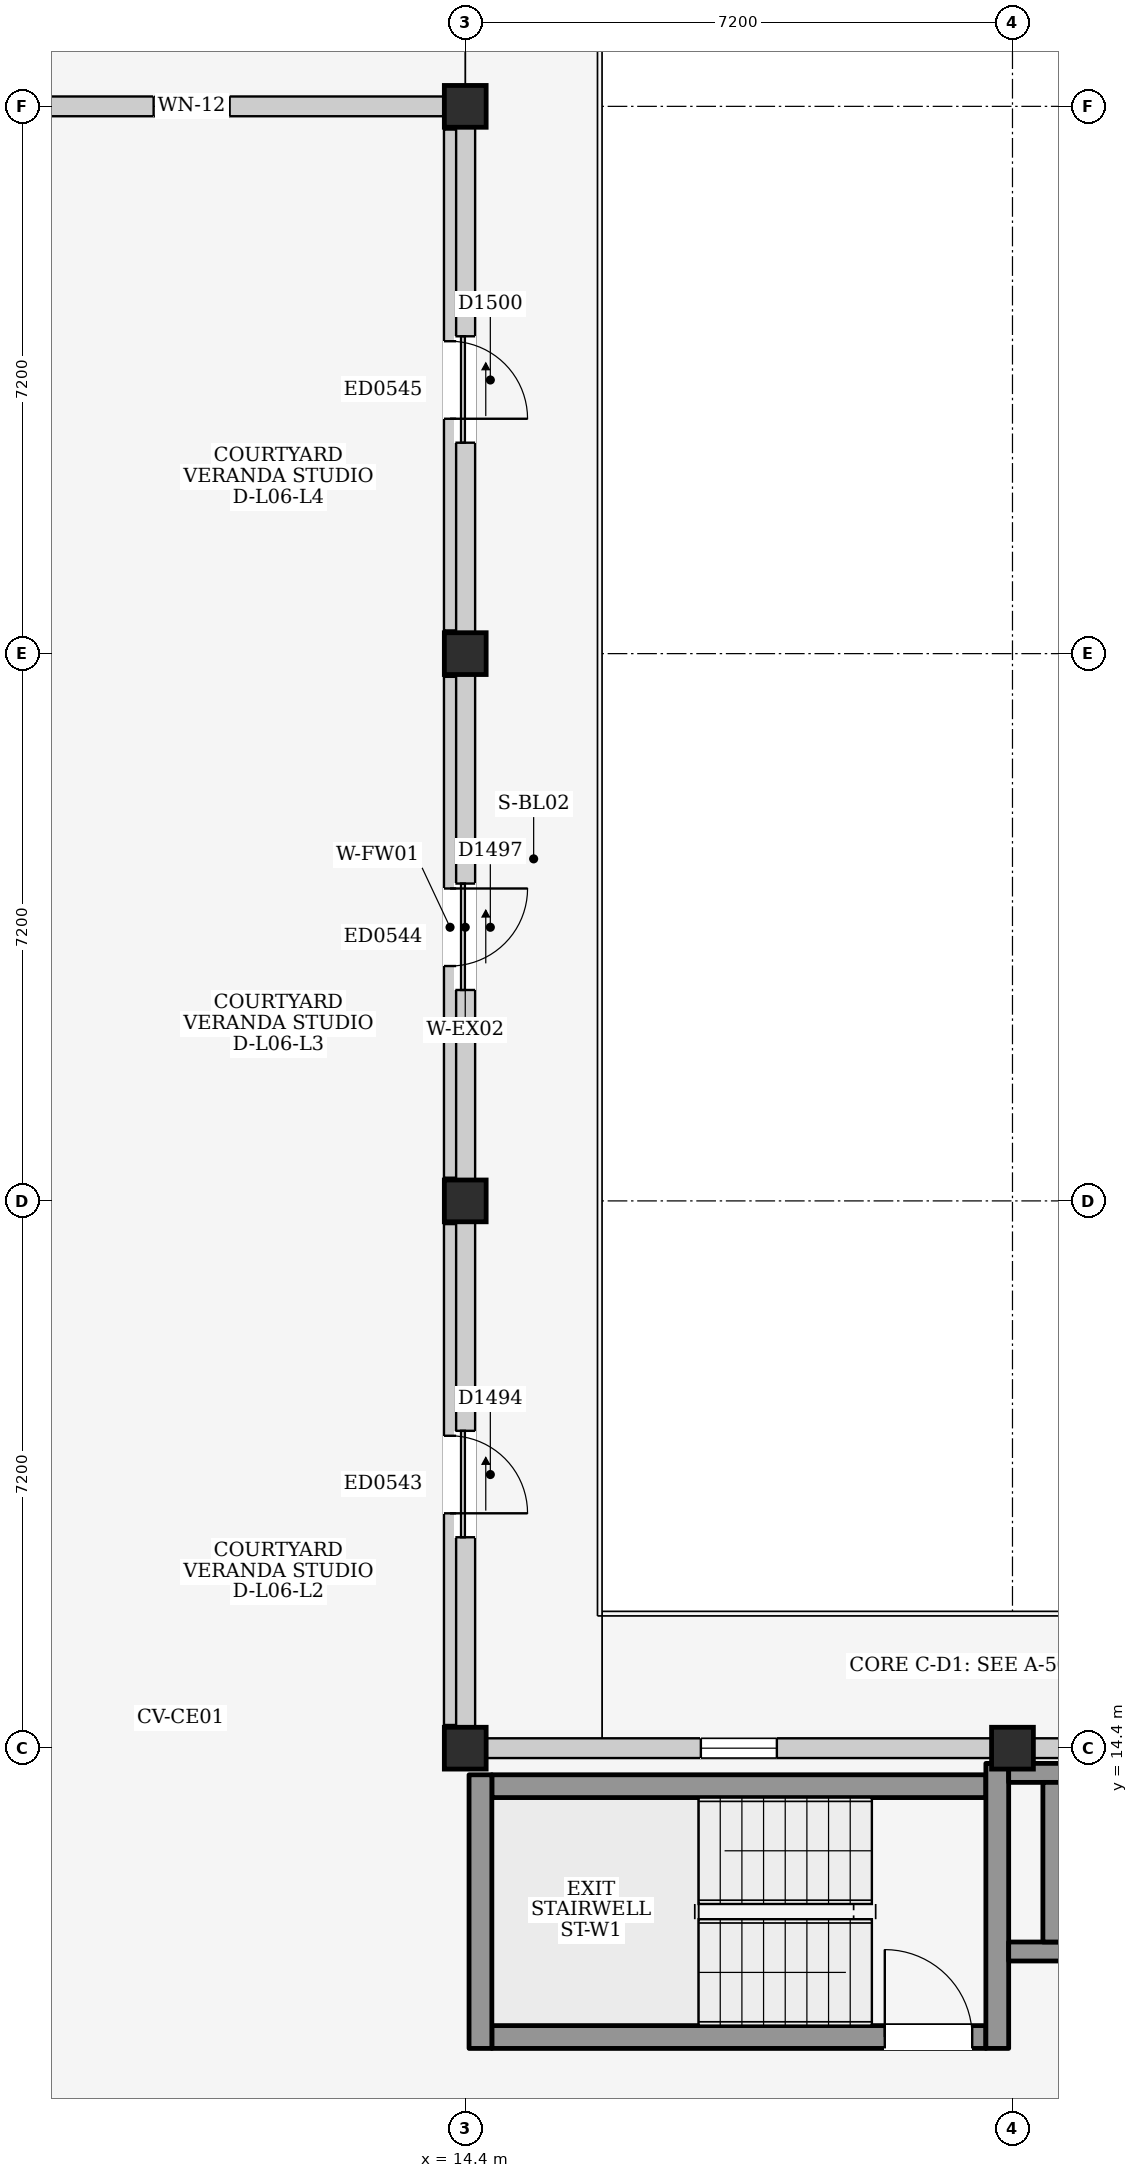
"""IFC4 building model, lengths in metres.
Left out: names, types, materials, properties, quantities, classifications, styles, units other than length and angle.
Written with IfcOpenShell. Run it as: python <this file> out.ifc"""

import sys

from ifc_helpers import new_model, si_unit, direction, frame, frame_2d, origin, origin_2d, place, context, subcontext, project, spatial, rectangle, extrude, element, fill, save


model = new_model("IFC4")
c1 = context("Model", 3, precision=1e-05, world=origin(), true_north=direction((0.0, 1.0)))
c2 = subcontext(c1, "Body", "Model", "MODEL_VIEW")
j1 = project(units=[si_unit("LENGTHUNIT", "METRE"), si_unit("PLANEANGLEUNIT", "RADIAN")], contexts=[c1])
p1 = place(None, origin())
s1 = spatial("IfcSite", under=j1, at=p1, CompositionType="ELEMENT")
p2 = place(p1, origin())
s2 = spatial("IfcBuilding", under=s1, at=p2, CompositionType="ELEMENT")
p3 = place(p2, frame((0.0, 0.0, 21.9)))
s3 = spatial("IfcBuildingStorey", under=s2, at=p3, CompositionType="ELEMENT", Elevation=21.9)
for number, where, z_axis, x_axis in (
    (1, (14.4, 14.4, 0.0), (0.0, 0.0, 1.0), (1.0, 0.0, 0.0)),
    (2, (14.4, 21.6, 0.0), (0.0, 0.0, 1.0), (1.0, 0.0, 0.0)),
    (3, (14.4, 28.8, 0.0), (0.0, 0.0, 1.0), (1.0, 0.0, 0.0)),
    (4, (14.4, 36.0, 0.0), (0.0, 0.0, 1.0), (1.0, 0.0, 0.0)),
    (5, (21.6, 14.4, 0.0), (0.0, 0.0, 1.0), (1.0, 0.0, 0.0)),
):
    element("IfcColumn", number, at=place(p3, frame(where, z_axis=z_axis, x_axis=x_axis)), inside=s3, PredefinedType="COLUMN", context=c2, shape_type="SweptSolid", body=[
        extrude(rectangle(XDim=0.55, YDim=0.55, at=origin_2d()), origin(), (0.0, 0.0, 1.0), 3.2),
    ])
p4 = place(p3, frame((14.4, 14.675, 0.0), z_axis=(0.0, 0.0, 1.0), x_axis=(0.0, 1.0, 0.0)))
e6 = element("IfcWall", 6, at=p4, inside=s3, PredefinedType="ELEMENTEDWALL", context=c2, shape_type="SweptSolid", body=[
    extrude(rectangle(XDim=6.65, YDim=0.26, at=frame_2d((3.325, 0.0))), origin(), (0.0, 0.0, 1.0), 2.465),
])
p5 = place(p4, frame((2.5, 0.0, 0.0)))
e7 = element("IfcOpeningElement", 7, at=p5, cuts=e6, PredefinedType="OPENING", context=c2, shape_type="SweptSolid", body=[
    extrude(rectangle(XDim=1.4, YDim=2.1, at=frame_2d((0.7, 1.05))), frame((0.0, 0.145, 0.0), z_axis=(0.0, -1.0, 0.0), x_axis=(1.0, 0.0, 0.0)), (0.0, 0.0, 1.0), 0.29),
])
p6 = place(p3, frame((14.4, 21.875, 0.0), z_axis=(0.0, 0.0, 1.0), x_axis=(0.0, 1.0, 0.0)))
e8 = element("IfcWall", 8, at=p6, inside=s3, PredefinedType="ELEMENTEDWALL", context=c2, shape_type="SweptSolid", body=[
    extrude(rectangle(XDim=6.65, YDim=0.26, at=frame_2d((3.325, 0.0))), origin(), (0.0, 0.0, 1.0), 2.465),
])
p7 = place(p6, frame((2.5, 0.0, 0.0)))
e9 = element("IfcOpeningElement", 9, at=p7, cuts=e8, PredefinedType="OPENING", context=c2, shape_type="SweptSolid", body=[
    extrude(rectangle(XDim=1.4, YDim=2.1, at=frame_2d((0.7, 1.05))), frame((0.0, 0.145, 0.0), z_axis=(0.0, -1.0, 0.0), x_axis=(1.0, 0.0, 0.0)), (0.0, 0.0, 1.0), 0.29),
])
p8 = place(p3, frame((7.475, 36.0, 0.0), z_axis=(0.0, 0.0, 1.0), x_axis=(1.0, 0.0, 0.0)))
e10 = element("IfcWall", 10, at=p8, inside=s3, PredefinedType="ELEMENTEDWALL", context=c2, shape_type="SweptSolid", body=[
    extrude(rectangle(XDim=6.65, YDim=0.26, at=frame_2d((3.325, 0.0))), origin(), (0.0, 0.0, 1.0), 2.365),
])
p9 = place(p8, frame((2.825, 0.0, 1.1)))
e11 = element("IfcOpeningElement", 11, at=p9, cuts=e10, PredefinedType="OPENING", context=c2, shape_type="SweptSolid", body=[
    extrude(rectangle(XDim=1.0, YDim=0.9, at=frame_2d((0.5, 0.45))), frame((0.0, 0.145, 0.0), z_axis=(0.0, -1.0, 0.0), x_axis=(1.0, 0.0, 0.0)), (0.0, 0.0, 1.0), 0.29),
])
p10 = place(p3, frame((14.4, 29.075, 0.0), z_axis=(0.0, 0.0, 1.0), x_axis=(0.0, 1.0, 0.0)))
e12 = element("IfcWall", 12, at=p10, inside=s3, PredefinedType="ELEMENTEDWALL", context=c2, shape_type="SweptSolid", body=[
    extrude(rectangle(XDim=6.65, YDim=0.26, at=frame_2d((3.325, 0.0))), origin(), (0.0, 0.0, 1.0), 2.465),
])
p11 = place(p10, frame((2.5, 0.0, 0.0)))
e13 = element("IfcOpeningElement", 13, at=p11, cuts=e12, PredefinedType="OPENING", context=c2, shape_type="SweptSolid", body=[
    extrude(rectangle(XDim=1.4, YDim=2.1, at=frame_2d((0.7, 1.05))), frame((0.0, 0.145, 0.0), z_axis=(0.0, -1.0, 0.0), x_axis=(1.0, 0.0, 0.0)), (0.0, 0.0, 1.0), 0.29),
])
p12 = place(p3, frame((14.675, 14.4, 0.0), z_axis=(0.0, 0.0, 1.0), x_axis=(1.0, 0.0, 0.0)))
e14 = element("IfcWall", 14, at=p12, inside=s3, PredefinedType="ELEMENTEDWALL", context=c2, shape_type="SweptSolid", body=[
    extrude(rectangle(XDim=6.65, YDim=0.26, at=frame_2d((3.325, 0.0))), origin(), (0.0, 0.0, 1.0), 2.365),
])
p13 = place(p12, frame((2.825, 0.0, 1.2)))
e15 = element("IfcOpeningElement", 15, at=p13, cuts=e14, PredefinedType="OPENING", context=c2, shape_type="SweptSolid", body=[
    extrude(rectangle(XDim=1.0, YDim=0.9, at=frame_2d((0.5, 0.45))), frame((0.0, 0.145, 0.0), z_axis=(0.0, -1.0, 0.0), x_axis=(1.0, 0.0, 0.0)), (0.0, 0.0, 1.0), 0.29),
])
p14 = place(p3, frame((21.875, 14.4, 0.0), z_axis=(0.0, 0.0, 1.0), x_axis=(1.0, 0.0, 0.0)))
e16 = element("IfcWall", 16, at=p14, inside=s3, PredefinedType="ELEMENTEDWALL", context=c2, shape_type="SweptSolid", body=[
    extrude(rectangle(XDim=6.65, YDim=0.26, at=frame_2d((3.325, 0.0))), origin(), (0.0, 0.0, 1.0), 2.365),
])
p15 = place(p14, frame((2.825, 0.0, 1.2)))
e17 = element("IfcOpeningElement", 17, at=p15, cuts=e16, PredefinedType="OPENING", context=c2, shape_type="SweptSolid", body=[
    extrude(rectangle(XDim=1.0, YDim=0.9, at=frame_2d((0.5, 0.45))), frame((0.0, 0.145, 0.0), z_axis=(0.0, -1.0, 0.0), x_axis=(1.0, 0.0, 0.0)), (0.0, 0.0, 1.0), 0.29),
])
p16 = place(p3, frame((14.75, 10.6, 0.0), z_axis=(0.0, 0.0, 1.0), x_axis=(1.0, 0.0, 0.0)))
e18 = element("IfcWall", 18, at=p16, inside=s3, PredefinedType="SHEAR", context=c2, shape_type="SweptSolid", body=[
    extrude(rectangle(XDim=6.5, YDim=0.3, at=frame_2d((3.25, 0.0))), origin(), (0.0, 0.0, 1.0), 2.98),
])
p17 = place(p16, frame((5.17, 0.0, 0.0)))
e19 = element("IfcOpeningElement", 19, at=p17, cuts=e18, PredefinedType="OPENING", context=c2, shape_type="SweptSolid", body=[
    extrude(rectangle(XDim=1.15, YDim=2.2, at=frame_2d((0.575, 1.1))), frame((0.0, 0.165, 0.0), z_axis=(0.0, -1.0, 0.0), x_axis=(1.0, 0.0, 0.0)), (0.0, 0.0, 1.0), 0.33),
])
p18 = place(p3, frame((14.75, 13.9, 0.0), z_axis=(0.0, 0.0, 1.0), x_axis=(1.0, 0.0, 0.0)))
e20 = element("IfcWall", 20, at=p18, inside=s3, PredefinedType="SHEAR", context=c2, shape_type="SweptSolid", body=[
    extrude(rectangle(XDim=6.5, YDim=0.3, at=frame_2d((3.25, 0.0))), origin(), (0.0, 0.0, 1.0), 2.98),
])
p19 = place(p3, frame((14.6, 10.45, 0.0), z_axis=(0.0, 0.0, 1.0), x_axis=(0.0, 1.0, 0.0)))
e21 = element("IfcWall", 21, at=p19, inside=s3, PredefinedType="SHEAR", context=c2, shape_type="SweptSolid", body=[
    extrude(rectangle(XDim=3.6, YDim=0.3, at=frame_2d((1.8, 0.0))), origin(), (0.0, 0.0, 1.0), 2.98),
])
p20 = place(p3, frame((21.4, 10.45, 0.0), z_axis=(0.0, 0.0, 1.0), x_axis=(0.0, 1.0, 0.0)))
e22 = element("IfcWall", 22, at=p20, inside=s3, PredefinedType="SHEAR", context=c2, shape_type="SweptSolid", body=[
    extrude(rectangle(XDim=3.75, YDim=0.3, at=frame_2d((1.875, 0.0))), origin(), (0.0, 0.0, 1.0), 2.98),
])
p21 = place(p3, frame((21.55, 11.725, 0.0), z_axis=(0.0, 0.0, 1.0), x_axis=(1.0, 0.0, 0.0)))
e23 = element("IfcWall", 23, at=p21, inside=s3, PredefinedType="SHEAR", context=c2, shape_type="SweptSolid", body=[
    extrude(rectangle(XDim=2.55, YDim=0.25, at=frame_2d((1.275, 0.0))), origin(), (0.0, 0.0, 1.0), 2.98),
])
p22 = place(p21, frame((0.95, 0.0, 0.0)))
e24 = element("IfcOpeningElement", 24, at=p22, cuts=e23, PredefinedType="OPENING", context=c2, shape_type="SweptSolid", body=[
    extrude(rectangle(XDim=1.1, YDim=2.15, at=frame_2d((0.55, 1.075))), frame((0.0, 0.14, 0.0), z_axis=(0.0, -1.0, 0.0), x_axis=(1.0, 0.0, 0.0)), (0.0, 0.0, 1.0), 0.28),
])
p23 = place(p3, frame((21.55, 14.075, 0.0), z_axis=(0.0, 0.0, 1.0), x_axis=(1.0, 0.0, 0.0)))
e25 = element("IfcWall", 25, at=p23, inside=s3, PredefinedType="SHEAR", context=c2, shape_type="SweptSolid", body=[
    extrude(rectangle(XDim=2.55, YDim=0.25, at=frame_2d((1.275, 0.0))), origin(), (0.0, 0.0, 1.0), 2.98),
])
p24 = place(p3, frame((22.125, 11.85, 0.0), z_axis=(0.0, 0.0, 1.0), x_axis=(0.0, 1.0, 0.0)))
e26 = element("IfcWall", 26, at=p24, inside=s3, PredefinedType="SHEAR", context=c2, shape_type="SweptSolid", body=[
    extrude(rectangle(XDim=2.1, YDim=0.25, at=frame_2d((1.05, 0.0))), origin(), (0.0, 0.0, 1.0), 2.98),
])
p25 = place(p3, frame((14.2, 14.705, 0.0), z_axis=(0.0, 0.0, 1.0), x_axis=(0.0, 1.0, 0.0)))
e27 = element("IfcWall", 27, at=p25, inside=s3, PredefinedType="PARTITIONING", context=c2, shape_type="SweptSolid", body=[
    extrude(rectangle(XDim=6.59, YDim=0.16, at=frame_2d((3.295, 0.0))), origin(), (0.0, 0.0, 1.0), 2.98),
])
p26 = place(p25, frame((2.785, 0.0, 0.0)))
e28 = element("IfcOpeningElement", 28, at=p26, cuts=e27, PredefinedType="OPENING", context=c2, shape_type="SweptSolid", body=[
    extrude(rectangle(XDim=1.02, YDim=2.18, at=frame_2d((0.51, 1.09))), frame((0.0, 0.095, 0.0), z_axis=(0.0, -1.0, 0.0), x_axis=(1.0, 0.0, 0.0)), (0.0, 0.0, 1.0), 0.19),
])
p27 = place(p3, frame((14.2, 21.905, 0.0), z_axis=(0.0, 0.0, 1.0), x_axis=(0.0, 1.0, 0.0)))
e29 = element("IfcWall", 29, at=p27, inside=s3, PredefinedType="PARTITIONING", context=c2, shape_type="SweptSolid", body=[
    extrude(rectangle(XDim=6.59, YDim=0.16, at=frame_2d((3.295, 0.0))), origin(), (0.0, 0.0, 1.0), 2.98),
])
p28 = place(p27, frame((2.785, 0.0, 0.0)))
e30 = element("IfcOpeningElement", 30, at=p28, cuts=e29, PredefinedType="OPENING", context=c2, shape_type="SweptSolid", body=[
    extrude(rectangle(XDim=1.02, YDim=2.18, at=frame_2d((0.51, 1.09))), frame((0.0, 0.095, 0.0), z_axis=(0.0, -1.0, 0.0), x_axis=(1.0, 0.0, 0.0)), (0.0, 0.0, 1.0), 0.19),
])
p29 = place(p3, frame((14.2, 29.105, 0.0), z_axis=(0.0, 0.0, 1.0), x_axis=(0.0, 1.0, 0.0)))
e31 = element("IfcWall", 31, at=p29, inside=s3, PredefinedType="PARTITIONING", context=c2, shape_type="SweptSolid", body=[
    extrude(rectangle(XDim=6.59, YDim=0.16, at=frame_2d((3.295, 0.0))), origin(), (0.0, 0.0, 1.0), 2.98),
])
p30 = place(p29, frame((2.785, 0.0, 0.0)))
e32 = element("IfcOpeningElement", 32, at=p30, cuts=e31, PredefinedType="OPENING", context=c2, shape_type="SweptSolid", body=[
    extrude(rectangle(XDim=1.02, YDim=2.18, at=frame_2d((0.51, 1.09))), frame((0.0, 0.095, 0.0), z_axis=(0.0, -1.0, 0.0), x_axis=(1.0, 0.0, 0.0)), (0.0, 0.0, 1.0), 0.19),
])
p31 = place(p5, frame((1.4, 0.0, 0.0), z_axis=(0.0, 0.0, 1.0), x_axis=(-1.0, 0.0, 0.0)))
e33 = element("IfcDoor", 33, at=p31, inside=s3, OperationType="SLIDING_TO_RIGHT", PredefinedType="DOOR", context=c2, shape_type="SweptSolid", body=[
    extrude(rectangle(XDim=1.4, YDim=2.1, at=frame_2d((0.7, 1.05))), frame((0.0, 0.025, 0.0), z_axis=(0.0, -1.0, 0.0), x_axis=(1.0, 0.0, 0.0)), (0.0, 0.0, 1.0), 0.05),
])
fill(e7, e33)
p32 = place(p7, frame((1.4, 0.0, 0.0), z_axis=(0.0, 0.0, 1.0), x_axis=(-1.0, 0.0, 0.0)))
e34 = element("IfcDoor", 34, at=p32, inside=s3, OperationType="SLIDING_TO_RIGHT", PredefinedType="DOOR", context=c2, shape_type="SweptSolid", body=[
    extrude(rectangle(XDim=1.4, YDim=2.1, at=frame_2d((0.7, 1.05))), frame((0.0, 0.025, 0.0), z_axis=(0.0, -1.0, 0.0), x_axis=(1.0, 0.0, 0.0)), (0.0, 0.0, 1.0), 0.05),
])
fill(e9, e34)
p33 = place(p9, origin())
e35 = element("IfcWindow", 35, at=p33, inside=s3, PartitioningType="SINGLE_PANEL", PredefinedType="WINDOW", context=c2, shape_type="SweptSolid", body=[
    extrude(rectangle(XDim=1.0, YDim=0.9, at=frame_2d((0.5, 0.45))), frame((0.0, 0.03, 0.0), z_axis=(0.0, -1.0, 0.0), x_axis=(1.0, 0.0, 0.0)), (0.0, 0.0, 1.0), 0.06),
])
fill(e11, e35)
p34 = place(p11, frame((1.4, 0.0, 0.0), z_axis=(0.0, 0.0, 1.0), x_axis=(-1.0, 0.0, 0.0)))
e36 = element("IfcDoor", 36, at=p34, inside=s3, OperationType="SLIDING_TO_RIGHT", PredefinedType="DOOR", context=c2, shape_type="SweptSolid", body=[
    extrude(rectangle(XDim=1.4, YDim=2.1, at=frame_2d((0.7, 1.05))), frame((0.0, 0.025, 0.0), z_axis=(0.0, -1.0, 0.0), x_axis=(1.0, 0.0, 0.0)), (0.0, 0.0, 1.0), 0.05),
])
fill(e13, e36)
p35 = place(p13, origin())
e37 = element("IfcWindow", 37, at=p35, inside=s3, PartitioningType="SINGLE_PANEL", PredefinedType="WINDOW", context=c2, shape_type="SweptSolid", body=[
    extrude(rectangle(XDim=1.0, YDim=0.9, at=frame_2d((0.5, 0.45))), frame((0.0, 0.03, 0.0), z_axis=(0.0, -1.0, 0.0), x_axis=(1.0, 0.0, 0.0)), (0.0, 0.0, 1.0), 0.06),
])
fill(e15, e37)
p36 = place(p17, origin())
e38 = element("IfcDoor", 38, at=p36, inside=s3, OperationType="SINGLE_SWING_LEFT", PredefinedType="DOOR", context=c2, shape_type="SweptSolid", body=[
    extrude(rectangle(XDim=1.15, YDim=2.2, at=frame_2d((0.575, 1.1))), frame((0.0, 0.025, 0.0), z_axis=(0.0, -1.0, 0.0), x_axis=(1.0, 0.0, 0.0)), (0.0, 0.0, 1.0), 0.05),
])
fill(e19, e38)
p37 = place(p26, frame((1.02, 0.0, 0.0), z_axis=(0.0, 0.0, 1.0), x_axis=(-1.0, 0.0, 0.0)))
e39 = element("IfcDoor", 39, at=p37, inside=s3, OperationType="SINGLE_SWING_RIGHT", PredefinedType="DOOR", context=c2, shape_type="SweptSolid", body=[
    extrude(rectangle(XDim=1.02, YDim=2.18, at=frame_2d((0.51, 1.09))), frame((0.0, 0.025, 0.0), z_axis=(0.0, -1.0, 0.0), x_axis=(1.0, 0.0, 0.0)), (0.0, 0.0, 1.0), 0.05),
])
fill(e28, e39)
p38 = place(p28, frame((1.02, 0.0, 0.0), z_axis=(0.0, 0.0, 1.0), x_axis=(-1.0, 0.0, 0.0)))
e40 = element("IfcDoor", 40, at=p38, inside=s3, OperationType="SINGLE_SWING_LEFT", PredefinedType="DOOR", context=c2, shape_type="SweptSolid", body=[
    extrude(rectangle(XDim=1.02, YDim=2.18, at=frame_2d((0.51, 1.09))), frame((0.0, 0.025, 0.0), z_axis=(0.0, -1.0, 0.0), x_axis=(1.0, 0.0, 0.0)), (0.0, 0.0, 1.0), 0.05),
])
fill(e30, e40)
p39 = place(p30, frame((1.02, 0.0, 0.0), z_axis=(0.0, 0.0, 1.0), x_axis=(-1.0, 0.0, 0.0)))
e41 = element("IfcDoor", 41, at=p39, inside=s3, OperationType="SINGLE_SWING_RIGHT", PredefinedType="DOOR", context=c2, shape_type="SweptSolid", body=[
    extrude(rectangle(XDim=1.02, YDim=2.18, at=frame_2d((0.51, 1.09))), frame((0.0, 0.025, 0.0), z_axis=(0.0, -1.0, 0.0), x_axis=(1.0, 0.0, 0.0)), (0.0, 0.0, 1.0), 0.05),
])
fill(e32, e41)
save(model, sys.argv[1])
